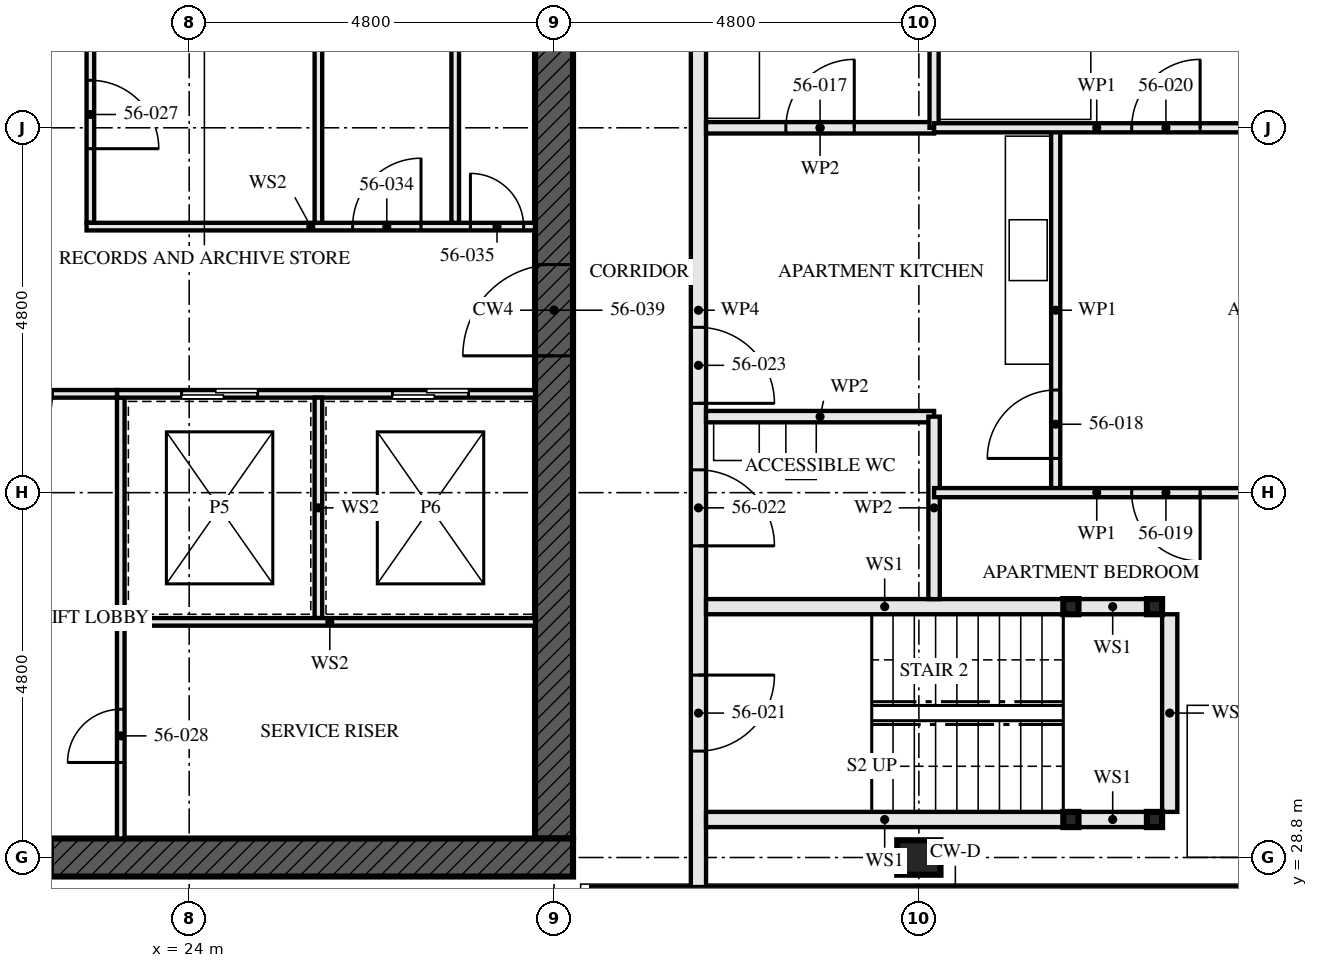
"""IFC4 building model, lengths in metres.
Left out: names, types, materials, properties, quantities, classifications, styles, units other than length and angle.
Written with IfcOpenShell. Run it as: python <this file> out.ifc"""

import sys

from ifc_helpers import new_model, si_unit, direction, frame, frame_2d, origin, origin_2d, place, context, subcontext, project, spatial, rectangle, hollow_rectangle, i_section, extrude, element, fill, save


model = new_model("IFC4")
c1 = context("Model", 3, precision=1e-05, world=origin(), true_north=direction((0.0, 1.0)))
c2 = subcontext(c1, "Body", "Model", "MODEL_VIEW")
j1 = project(units=[si_unit("LENGTHUNIT", "METRE"), si_unit("PLANEANGLEUNIT", "RADIAN")], contexts=[c1])
p1 = place(None, origin())
s1 = spatial("IfcSite", under=j1, at=p1, CompositionType="ELEMENT")
p2 = place(p1, origin())
s2 = spatial("IfcBuilding", under=s1, at=p2, CompositionType="ELEMENT")
p3 = place(p2, frame((0.0, 0.0, 205.0)))
s3 = spatial("IfcBuildingStorey", under=s2, at=p3, CompositionType="ELEMENT", Elevation=205.0)
p4 = place(p3, frame((33.6, 28.8, 0.0), z_axis=(0.0, 0.0, 1.0), x_axis=(0.0, 1.0, 0.0)))
e1 = element("IfcColumn", 1, at=p4, inside=s3, PredefinedType="COLUMN", context=c2, shape_type="SweptSolid", body=[
    extrude(i_section(OverallWidth=0.454, OverallDepth=0.569, WebThickness=0.078, FlangeThickness=0.125, FilletRadius=0.015, at=origin_2d()), origin(), (0.0, 0.0, 1.0), 3.5),
])
p5 = place(p3, frame((14.15, 28.8, -0.17), z_axis=(0.0, 0.0, 1.0), x_axis=(1.0, 0.0, 0.0)))
e2 = element("IfcWall", 2, at=p5, inside=s3, PredefinedType="SHEAR", context=c2, shape_type="SweptSolid", body=[
    extrude(rectangle(XDim=14.9, YDim=0.5, at=frame_2d((7.45, 0.0))), origin(), (0.0, 0.0, 1.0), 3.5),
])
p6 = place(p5, frame((6.85, 0.0, 0.17)))
e3 = element("IfcOpeningElement", 3, at=p6, cuts=e2, PredefinedType="OPENING", context=c2, shape_type="SweptSolid", body=[
    extrude(rectangle(XDim=1.2, YDim=2.1, at=frame_2d((0.6, 1.05))), frame((0.0, 0.26, 0.0), z_axis=(0.0, -1.0, 0.0), x_axis=(1.0, 0.0, 0.0)), (0.0, 0.0, 1.0), 0.521),
])
p7 = place(p3, frame((28.8, 29.05, -0.17), z_axis=(0.0, 0.0, 1.0), x_axis=(0.0, 1.0, 0.0)))
e4 = element("IfcWall", 4, at=p7, inside=s3, PredefinedType="SHEAR", context=c2, shape_type="SweptSolid", body=[
    extrude(rectangle(XDim=13.9, YDim=0.5, at=frame_2d((6.95, 0.0))), origin(), (0.0, 0.0, 1.0), 3.5),
])
p8 = place(p7, frame((6.35, 0.0, 0.17)))
e5 = element("IfcOpeningElement", 5, at=p8, cuts=e4, PredefinedType="OPENING", context=c2, shape_type="SweptSolid", body=[
    extrude(rectangle(XDim=1.2, YDim=2.1, at=frame_2d((0.6, 1.05))), frame((0.0, 0.26, 0.0), z_axis=(0.0, -1.0, 0.0), x_axis=(1.0, 0.0, 0.0)), (0.0, 0.0, 1.0), 0.521),
])
for number, where, z_axis, x_axis in (
    (6, (36.7, 29.3, 0.0), (0.0, 0.0, 1.0), (1.0, 0.0, 0.0)),
    (7, (36.7, 32.1, 0.0), (0.0, 0.0, 1.0), (1.0, 0.0, 0.0)),
    (8, (35.6, 29.3, 0.0), (0.0, 0.0, 1.0), (1.0, 0.0, 0.0)),
    (9, (35.6, 32.1, 0.0), (0.0, 0.0, 1.0), (1.0, 0.0, 0.0)),
):
    element("IfcColumn", number, at=place(p3, frame(where, z_axis=z_axis, x_axis=x_axis)), inside=s3, PredefinedType="COLUMN", context=c2, shape_type="SweptSolid", body=[
        extrude(hollow_rectangle(XDim=0.2, YDim=0.2, WallThickness=0.008, at=origin_2d()), origin(), (0.0, 0.0, 1.0), 3.33),
    ])
p9 = place(p3, frame((36.6, 29.3, 0.0), z_axis=(0.0, 0.0, 1.0), x_axis=(-1.0, 0.0, 0.0)))
e10 = element("IfcWall", 10, at=p9, inside=s3, PredefinedType="SOLIDWALL", context=c2, shape_type="SweptSolid", body=[
    extrude(rectangle(XDim=0.9, YDim=0.2, at=frame_2d((0.45, 0.0))), origin(), (0.0, 0.0, 1.0), 2.99),
])
p10 = place(p3, frame((35.5, 29.3, 0.0), z_axis=(0.0, 0.0, 1.0), x_axis=(-1.0, 0.0, 0.0)))
e11 = element("IfcWall", 11, at=p10, inside=s3, PredefinedType="SOLIDWALL", context=c2, shape_type="SweptSolid", body=[
    extrude(rectangle(XDim=4.7, YDim=0.2, at=frame_2d((2.35, 0.0))), origin(), (0.0, 0.0, 1.0), 2.99),
])
p11 = place(p3, frame((36.6, 32.1, 0.0), z_axis=(0.0, 0.0, 1.0), x_axis=(-1.0, 0.0, 0.0)))
e12 = element("IfcWall", 12, at=p11, inside=s3, PredefinedType="SOLIDWALL", context=c2, shape_type="SweptSolid", body=[
    extrude(rectangle(XDim=0.9, YDim=0.2, at=frame_2d((0.45, 0.0))), origin(), (0.0, 0.0, 1.0), 2.99),
])
p12 = place(p3, frame((35.5, 32.1, 0.0), z_axis=(0.0, 0.0, 1.0), x_axis=(-1.0, 0.0, 0.0)))
e13 = element("IfcWall", 13, at=p12, inside=s3, PredefinedType="SOLIDWALL", context=c2, shape_type="SweptSolid", body=[
    extrude(rectangle(XDim=4.7, YDim=0.2, at=frame_2d((2.35, 0.0))), origin(), (0.0, 0.0, 1.0), 2.99),
])
p13 = place(p3, frame((36.9, 29.4, 0.0), z_axis=(0.0, 0.0, 1.0), x_axis=(0.0, 1.0, 0.0)))
e14 = element("IfcWall", 14, at=p13, inside=s3, PredefinedType="SOLIDWALL", context=c2, shape_type="SweptSolid", body=[
    extrude(rectangle(XDim=2.6, YDim=0.2, at=frame_2d((1.3, 0.0))), origin(), (0.0, 0.0, 1.0), 3.33),
])
p14 = place(p3, frame((33.8, 32.2, 0.0), z_axis=(0.0, 0.0, 1.0), x_axis=(0.0, 1.0, 0.0)))
e15 = element("IfcWall", 15, at=p14, inside=s3, PredefinedType="PARTITIONING", context=c2, shape_type="SweptSolid", body=[
    extrude(rectangle(XDim=2.4, YDim=0.15, at=frame_2d((1.2, 0.0))), origin(), (0.0, 0.0, 1.0), 2.55),
])
p15 = place(p3, frame((33.8, 34.6, 0.0), z_axis=(0.0, 0.0, 1.0), x_axis=(-1.0, 0.0, 0.0)))
e16 = element("IfcWall", 16, at=p15, inside=s3, PredefinedType="PARTITIONING", context=c2, shape_type="SweptSolid", body=[
    extrude(rectangle(XDim=3.0, YDim=0.15, at=frame_2d((1.5, 0.0))), origin(), (0.0, 0.0, 1.0), 3.33),
])
p16 = place(p3, frame((33.8, 38.4, 0.0), z_axis=(0.0, 0.0, 1.0), x_axis=(-1.0, 0.0, 0.0)))
e17 = element("IfcWall", 17, at=p16, inside=s3, PredefinedType="PARTITIONING", context=c2, shape_type="SweptSolid", body=[
    extrude(rectangle(XDim=3.0, YDim=0.15, at=frame_2d((1.5, 0.0))), origin(), (0.0, 0.0, 1.0), 2.55),
])
p17 = place(p16, frame((1.05, 0.0, 0.0)))
e18 = element("IfcOpeningElement", 18, at=p17, cuts=e17, PredefinedType="OPENING", context=c2, shape_type="SweptSolid", body=[
    extrude(rectangle(XDim=0.9, YDim=2.1, at=frame_2d((0.45, 1.05))), frame((0.0, 0.085, 0.0), z_axis=(0.0, -1.0, 0.0), x_axis=(1.0, 0.0, 0.0)), (0.0, 0.0, 1.0), 0.171),
])
p18 = place(p3, frame((35.4, 33.6, 0.0), z_axis=(0.0, 0.0, 1.0), x_axis=(0.0, 1.0, 0.0)))
e19 = element("IfcWall", 19, at=p18, inside=s3, PredefinedType="PARTITIONING", context=c2, shape_type="SweptSolid", body=[
    extrude(rectangle(XDim=4.8, YDim=0.12, at=frame_2d((2.4, 0.0))), origin(), (0.0, 0.0, 1.0), 3.33),
])
p19 = place(p18, frame((0.45, 0.0, 0.0)))
e20 = element("IfcOpeningElement", 20, at=p19, cuts=e19, PredefinedType="OPENING", context=c2, shape_type="SweptSolid", body=[
    extrude(rectangle(XDim=0.9, YDim=2.1, at=frame_2d((0.45, 1.05))), frame((0.0, 0.071, 0.0), z_axis=(0.0, -1.0, 0.0), x_axis=(1.0, 0.0, 0.0)), (0.0, 0.0, 1.0), 0.141),
])
p20 = place(p3, frame((33.8, 38.4, 0.0), z_axis=(0.0, 0.0, 1.0), x_axis=(0.0, 1.0, 0.0)))
e21 = element("IfcWall", 21, at=p20, inside=s3, PredefinedType="PARTITIONING", context=c2, shape_type="SweptSolid", body=[
    extrude(rectangle(XDim=4.553, YDim=0.12, at=frame_2d((2.276, 0.0))), origin(), (0.0, 0.0, 1.0), 3.33),
])
p21 = place(p3, frame((38.08, 33.6, 0.0), z_axis=(0.0, 0.0, 1.0), x_axis=(-1.0, 0.0, 0.0)))
e22 = element("IfcWall", 22, at=p21, inside=s3, PredefinedType="PARTITIONING", context=c2, shape_type="SweptSolid", body=[
    extrude(rectangle(XDim=4.28, YDim=0.12, at=frame_2d((2.14, 0.0))), origin(), (0.0, 0.0, 1.0), 2.55),
])
p22 = place(p21, frame((0.78, 0.0, 0.0)))
e23 = element("IfcOpeningElement", 23, at=p22, cuts=e22, PredefinedType="OPENING", context=c2, shape_type="SweptSolid", body=[
    extrude(rectangle(XDim=0.9, YDim=2.1, at=frame_2d((0.45, 1.05))), frame((0.0, 0.071, 0.0), z_axis=(0.0, -1.0, 0.0), x_axis=(1.0, 0.0, 0.0)), (0.0, 0.0, 1.0), 0.141),
])
p23 = place(p3, frame((38.08, 38.4, 0.0), z_axis=(0.0, 0.0, 1.0), x_axis=(-1.0, 0.0, 0.0)))
e24 = element("IfcWall", 24, at=p23, inside=s3, PredefinedType="PARTITIONING", context=c2, shape_type="SweptSolid", body=[
    extrude(rectangle(XDim=4.28, YDim=0.12, at=frame_2d((2.14, 0.0))), origin(), (0.0, 0.0, 1.0), 2.55),
])
p24 = place(p23, frame((0.78, 0.0, 0.0)))
e25 = element("IfcOpeningElement", 25, at=p24, cuts=e24, PredefinedType="OPENING", context=c2, shape_type="SweptSolid", body=[
    extrude(rectangle(XDim=0.9, YDim=2.1, at=frame_2d((0.45, 1.05))), frame((0.0, 0.071, 0.0), z_axis=(0.0, -1.0, 0.0), x_axis=(1.0, 0.0, 0.0)), (0.0, 0.0, 1.0), 0.141),
])
p25 = place(p3, frame((30.7, 28.345, 0.0), z_axis=(0.0, 0.0, 1.0), x_axis=(0.0, 1.0, 0.0)))
e26 = element("IfcWall", 26, at=p25, inside=s3, PredefinedType="PARTITIONING", context=c2, shape_type="SweptSolid", body=[
    extrude(rectangle(XDim=15.31, YDim=0.2, at=frame_2d((7.655, 0.0))), origin(), (0.0, 0.0, 1.0), 2.32),
])
p26 = place(p25, frame((1.855, 0.0, 0.0)))
e27 = element("IfcOpeningElement", 27, at=p26, cuts=e26, PredefinedType="OPENING", context=c2, shape_type="SweptSolid", body=[
    extrude(rectangle(XDim=1.0, YDim=2.1, at=frame_2d((0.5, 1.05))), frame((0.0, 0.111, 0.0), z_axis=(0.0, -1.0, 0.0), x_axis=(1.0, 0.0, 0.0)), (0.0, 0.0, 1.0), 0.221),
])
p27 = place(p25, frame((4.555, 0.0, 0.0)))
e28 = element("IfcOpeningElement", 28, at=p27, cuts=e26, PredefinedType="OPENING", context=c2, shape_type="SweptSolid", body=[
    extrude(rectangle(XDim=1.0, YDim=2.1, at=frame_2d((0.5, 1.05))), frame((0.0, 0.111, 0.0), z_axis=(0.0, -1.0, 0.0), x_axis=(1.0, 0.0, 0.0)), (0.0, 0.0, 1.0), 0.221),
])
p28 = place(p25, frame((6.43, 0.0, 0.0)))
e29 = element("IfcOpeningElement", 29, at=p28, cuts=e26, PredefinedType="OPENING", context=c2, shape_type="SweptSolid", body=[
    extrude(rectangle(XDim=1.0, YDim=2.1, at=frame_2d((0.5, 1.05))), frame((0.0, 0.111, 0.0), z_axis=(0.0, -1.0, 0.0), x_axis=(1.0, 0.0, 0.0)), (0.0, 0.0, 1.0), 0.221),
])
p29 = place(p3, frame((27.5, 37.15, 0.0), z_axis=(0.0, 0.0, 1.0), x_axis=(0.0, 1.0, 0.0)))
e30 = element("IfcWall", 30, at=p29, inside=s3, PredefinedType="SOLIDWALL", context=c2, shape_type="SweptSolid", body=[
    extrude(rectangle(XDim=5.8, YDim=0.1, at=frame_2d((2.9, 0.0))), origin(), (0.0, 0.0, 1.0), 3.33),
])
p30 = place(p3, frame((22.7, 37.15, 0.0), z_axis=(0.0, 0.0, 1.0), x_axis=(0.0, 1.0, 0.0)))
e31 = element("IfcWall", 31, at=p30, inside=s3, PredefinedType="SOLIDWALL", context=c2, shape_type="SweptSolid", body=[
    extrude(rectangle(XDim=5.8, YDim=0.1, at=frame_2d((2.9, 0.0))), origin(), (0.0, 0.0, 1.0), 3.33),
])
p31 = place(p30, frame((0.975, 0.0, 0.0)))
e32 = element("IfcOpeningElement", 32, at=p31, cuts=e31, PredefinedType="OPENING", context=c2, shape_type="SweptSolid", body=[
    extrude(rectangle(XDim=0.9, YDim=2.1, at=frame_2d((0.45, 1.05))), frame((0.0, 0.061, 0.0), z_axis=(0.0, -1.0, 0.0), x_axis=(1.0, 0.0, 0.0)), (0.0, 0.0, 1.0), 0.121),
])
p32 = place(p3, frame((23.1, 29.05, 0.0), z_axis=(0.0, 0.0, 1.0), x_axis=(0.0, 1.0, 0.0)))
e33 = element("IfcWall", 33, at=p32, inside=s3, PredefinedType="SOLIDWALL", context=c2, shape_type="SweptSolid", body=[
    extrude(rectangle(XDim=5.8, YDim=0.1, at=frame_2d((2.9, 0.0))), origin(), (0.0, 0.0, 1.0), 3.33),
])
p33 = place(p32, frame((1.0, 0.0, 0.0)))
e34 = element("IfcOpeningElement", 34, at=p33, cuts=e33, PredefinedType="OPENING", context=c2, shape_type="SweptSolid", body=[
    extrude(rectangle(XDim=0.7, YDim=2.1, at=frame_2d((0.35, 1.05))), frame((0.0, 0.061, 0.0), z_axis=(0.0, -1.0, 0.0), x_axis=(1.0, 0.0, 0.0)), (0.0, 0.0, 1.0), 0.121),
])
p34 = place(p3, frame((23.05, 34.9, 0.0), z_axis=(0.0, 0.0, 1.0), x_axis=(1.0, 0.0, 0.0)))
e35 = element("IfcWall", 35, at=p34, inside=s3, PredefinedType="SOLIDWALL", context=c2, shape_type="SweptSolid", body=[
    extrude(rectangle(XDim=5.5, YDim=0.1, at=frame_2d((2.75, 0.0))), origin(), (0.0, 0.0, 1.0), 3.33),
])
p35 = place(p34, frame((0.85, 0.0, 0.0)))
e36 = element("IfcOpeningElement", 36, at=p35, cuts=e35, PredefinedType="OPENING", context=c2, shape_type="SweptSolid", body=[
    extrude(rectangle(XDim=1.0, YDim=2.1, at=frame_2d((0.5, 1.05))), frame((0.0, 0.061, 0.0), z_axis=(0.0, -1.0, 0.0), x_axis=(1.0, 0.0, 0.0)), (0.0, 0.0, 1.0), 0.121),
])
p36 = place(p34, frame((3.625, 0.0, 0.0)))
e37 = element("IfcOpeningElement", 37, at=p36, cuts=e35, PredefinedType="OPENING", context=c2, shape_type="SweptSolid", body=[
    extrude(rectangle(XDim=1.0, YDim=2.1, at=frame_2d((0.5, 1.05))), frame((0.0, 0.061, 0.0), z_axis=(0.0, -1.0, 0.0), x_axis=(1.0, 0.0, 0.0)), (0.0, 0.0, 1.0), 0.121),
])
p37 = place(p3, frame((22.65, 37.1, 0.0), z_axis=(0.0, 0.0, 1.0), x_axis=(1.0, 0.0, 0.0)))
e38 = element("IfcWall", 38, at=p37, inside=s3, PredefinedType="SOLIDWALL", context=c2, shape_type="SweptSolid", body=[
    extrude(rectangle(XDim=5.9, YDim=0.1, at=frame_2d((2.95, 0.0))), origin(), (0.0, 0.0, 1.0), 3.33),
])
p38 = place(p37, frame((3.5, 0.0, 0.0)))
e39 = element("IfcOpeningElement", 39, at=p38, cuts=e38, PredefinedType="OPENING", context=c2, shape_type="SweptSolid", body=[
    extrude(rectangle(XDim=0.9, YDim=2.1, at=frame_2d((0.45, 1.05))), frame((0.0, 0.061, 0.0), z_axis=(0.0, -1.0, 0.0), x_axis=(1.0, 0.0, 0.0)), (0.0, 0.0, 1.0), 0.121),
])
p39 = place(p37, frame((5.05, 0.0, 0.0)))
e40 = element("IfcOpeningElement", 40, at=p39, cuts=e38, PredefinedType="OPENING", context=c2, shape_type="SweptSolid", body=[
    extrude(rectangle(XDim=0.7, YDim=2.1, at=frame_2d((0.35, 1.05))), frame((0.0, 0.061, 0.0), z_axis=(0.0, -1.0, 0.0), x_axis=(1.0, 0.0, 0.0)), (0.0, 0.0, 1.0), 0.121),
])
p40 = place(p3, frame((20.55, 34.9, 0.0), z_axis=(0.0, 0.0, 1.0), x_axis=(1.0, 0.0, 0.0)))
e41 = element("IfcWall", 41, at=p40, inside=s3, PredefinedType="SOLIDWALL", context=c2, shape_type="SweptSolid", body=[
    extrude(rectangle(XDim=2.5, YDim=0.1, at=frame_2d((1.25, 0.0))), origin(), (0.0, 0.0, 1.0), 3.33),
])
p41 = place(p40, frame((0.45, 0.0, 0.0)))
e42 = element("IfcOpeningElement", 42, at=p41, cuts=e41, PredefinedType="OPENING", context=c2, shape_type="SweptSolid", body=[
    extrude(rectangle(XDim=1.2, YDim=2.1, at=frame_2d((0.6, 1.05))), frame((0.0, 0.061, 0.0), z_axis=(0.0, -1.0, 0.0), x_axis=(1.0, 0.0, 0.0)), (0.0, 0.0, 1.0), 0.121),
])
p42 = place(p3, frame((25.7, 37.15, 0.0), z_axis=(0.0, 0.0, 1.0), x_axis=(0.0, 1.0, 0.0)))
e43 = element("IfcWall", 43, at=p42, inside=s3, PredefinedType="SOLIDWALL", context=c2, shape_type="SweptSolid", body=[
    extrude(rectangle(XDim=5.8, YDim=0.1, at=frame_2d((2.9, 0.0))), origin(), (0.0, 0.0, 1.0), 3.33),
])
p43 = place(p3, frame((25.7, 31.95, 0.0), z_axis=(0.0, 0.0, 1.0), x_axis=(0.0, 1.0, 0.0)))
e44 = element("IfcWall", 44, at=p43, inside=s3, PredefinedType="SOLIDWALL", context=c2, shape_type="SweptSolid", body=[
    extrude(rectangle(XDim=2.9, YDim=0.1, at=frame_2d((1.45, 0.0))), origin(), (0.0, 0.0, 1.0), 3.33),
])
p44 = place(p3, frame((23.15, 31.9, 0.0), z_axis=(0.0, 0.0, 1.0), x_axis=(1.0, 0.0, 0.0)))
e45 = element("IfcWall", 45, at=p44, inside=s3, PredefinedType="SOLIDWALL", context=c2, shape_type="SweptSolid", body=[
    extrude(rectangle(XDim=5.4, YDim=0.1, at=frame_2d((2.7, 0.0))), origin(), (0.0, 0.0, 1.0), 3.33),
])
p45 = place(p17, frame((0.9, 0.0, 0.0), z_axis=(0.0, 0.0, 1.0), x_axis=(-1.0, 0.0, 0.0)))
e46 = element("IfcDoor", 46, at=p45, inside=s3, OperationType="SINGLE_SWING_LEFT", PredefinedType="DOOR", context=c2, shape_type="SweptSolid", body=[
    extrude(rectangle(XDim=0.9, YDim=2.1, at=frame_2d((0.45, 1.05))), frame((0.0, 0.022, 0.0), z_axis=(0.0, -1.0, 0.0), x_axis=(1.0, 0.0, 0.0)), (0.0, 0.0, 1.0), 0.044),
])
fill(e18, e46)
p46 = place(p19, origin())
e47 = element("IfcDoor", 47, at=p46, inside=s3, OperationType="SINGLE_SWING_RIGHT", PredefinedType="DOOR", context=c2, shape_type="SweptSolid", body=[
    extrude(rectangle(XDim=0.9, YDim=2.1, at=frame_2d((0.45, 1.05))), frame((0.0, 0.022, 0.0), z_axis=(0.0, -1.0, 0.0), x_axis=(1.0, 0.0, 0.0)), (0.0, 0.0, 1.0), 0.044),
])
fill(e20, e47)
p47 = place(p22, origin())
e48 = element("IfcDoor", 48, at=p47, inside=s3, OperationType="SINGLE_SWING_RIGHT", PredefinedType="DOOR", context=c2, shape_type="SweptSolid", body=[
    extrude(rectangle(XDim=0.9, YDim=2.1, at=frame_2d((0.45, 1.05))), frame((0.0, 0.022, 0.0), z_axis=(0.0, -1.0, 0.0), x_axis=(1.0, 0.0, 0.0)), (0.0, 0.0, 1.0), 0.044),
])
fill(e23, e48)
p48 = place(p24, frame((0.9, 0.0, 0.0), z_axis=(0.0, 0.0, 1.0), x_axis=(-1.0, 0.0, 0.0)))
e49 = element("IfcDoor", 49, at=p48, inside=s3, OperationType="SINGLE_SWING_LEFT", PredefinedType="DOOR", context=c2, shape_type="SweptSolid", body=[
    extrude(rectangle(XDim=0.9, YDim=2.1, at=frame_2d((0.45, 1.05))), frame((0.0, 0.022, 0.0), z_axis=(0.0, -1.0, 0.0), x_axis=(1.0, 0.0, 0.0)), (0.0, 0.0, 1.0), 0.044),
])
fill(e25, e49)
p49 = place(p26, frame((1.0, 0.0, 0.0), z_axis=(0.0, 0.0, 1.0), x_axis=(-1.0, 0.0, 0.0)))
e50 = element("IfcDoor", 50, at=p49, inside=s3, OperationType="SINGLE_SWING_RIGHT", PredefinedType="DOOR", context=c2, shape_type="SweptSolid", body=[
    extrude(rectangle(XDim=1.0, YDim=2.1, at=frame_2d((0.5, 1.05))), frame((0.0, 0.032, 0.0), z_axis=(0.0, -1.0, 0.0), x_axis=(1.0, 0.0, 0.0)), (0.0, 0.0, 1.0), 0.064),
])
fill(e27, e50)
p50 = place(p27, frame((1.0, 0.0, 0.0), z_axis=(0.0, 0.0, 1.0), x_axis=(-1.0, 0.0, 0.0)))
e51 = element("IfcDoor", 51, at=p50, inside=s3, OperationType="SINGLE_SWING_LEFT", PredefinedType="DOOR", context=c2, shape_type="SweptSolid", body=[
    extrude(rectangle(XDim=1.0, YDim=2.1, at=frame_2d((0.5, 1.05))), frame((0.0, 0.027, 0.0), z_axis=(0.0, -1.0, 0.0), x_axis=(1.0, 0.0, 0.0)), (0.0, 0.0, 1.0), 0.054),
])
fill(e28, e51)
p51 = place(p28, frame((1.0, 0.0, 0.0), z_axis=(0.0, 0.0, 1.0), x_axis=(-1.0, 0.0, 0.0)))
e52 = element("IfcDoor", 52, at=p51, inside=s3, OperationType="SINGLE_SWING_LEFT", PredefinedType="DOOR", context=c2, shape_type="SweptSolid", body=[
    extrude(rectangle(XDim=1.0, YDim=2.1, at=frame_2d((0.5, 1.05))), frame((0.0, 0.027, 0.0), z_axis=(0.0, -1.0, 0.0), x_axis=(1.0, 0.0, 0.0)), (0.0, 0.0, 1.0), 0.054),
])
fill(e29, e52)
p52 = place(p31, frame((0.9, 0.0, 0.0), z_axis=(0.0, 0.0, 1.0), x_axis=(-1.0, 0.0, 0.0)))
e53 = element("IfcDoor", 53, at=p52, inside=s3, OperationType="SINGLE_SWING_LEFT", PredefinedType="DOOR", context=c2, shape_type="SweptSolid", body=[
    extrude(rectangle(XDim=0.9, YDim=2.1, at=frame_2d((0.45, 1.05))), frame((0.0, 0.027, 0.0), z_axis=(0.0, -1.0, 0.0), x_axis=(1.0, 0.0, 0.0)), (0.0, 0.0, 1.0), 0.054),
])
fill(e32, e53)
p53 = place(p33, origin())
e54 = element("IfcDoor", 54, at=p53, inside=s3, OperationType="SINGLE_SWING_RIGHT", PredefinedType="DOOR", context=c2, shape_type="SweptSolid", body=[
    extrude(rectangle(XDim=0.7, YDim=2.1, at=frame_2d((0.35, 1.05))), frame((0.0, 0.027, 0.0), z_axis=(0.0, -1.0, 0.0), x_axis=(1.0, 0.0, 0.0)), (0.0, 0.0, 1.0), 0.054),
])
fill(e34, e54)
p54 = place(p35, origin())
e55 = element("IfcDoor", 55, at=p54, inside=s3, OperationType="SLIDING_TO_LEFT", PredefinedType="DOOR", context=c2, shape_type="SweptSolid", body=[
    extrude(rectangle(XDim=1.0, YDim=2.1, at=frame_2d((0.5, 1.05))), frame((0.0, 0.05, 0.0), z_axis=(0.0, -1.0, 0.0), x_axis=(1.0, 0.0, 0.0)), (0.0, 0.0, 1.0), 0.1),
])
fill(e36, e55)
p55 = place(p36, origin())
e56 = element("IfcDoor", 56, at=p55, inside=s3, OperationType="SLIDING_TO_LEFT", PredefinedType="DOOR", context=c2, shape_type="SweptSolid", body=[
    extrude(rectangle(XDim=1.0, YDim=2.1, at=frame_2d((0.5, 1.05))), frame((0.0, 0.05, 0.0), z_axis=(0.0, -1.0, 0.0), x_axis=(1.0, 0.0, 0.0)), (0.0, 0.0, 1.0), 0.1),
])
fill(e37, e56)
p56 = place(p38, origin())
e57 = element("IfcDoor", 57, at=p56, inside=s3, OperationType="SINGLE_SWING_LEFT", PredefinedType="DOOR", context=c2, shape_type="SweptSolid", body=[
    extrude(rectangle(XDim=0.9, YDim=2.1, at=frame_2d((0.45, 1.05))), frame((0.0, 0.027, 0.0), z_axis=(0.0, -1.0, 0.0), x_axis=(1.0, 0.0, 0.0)), (0.0, 0.0, 1.0), 0.054),
])
fill(e39, e57)
p57 = place(p39, origin())
e58 = element("IfcDoor", 58, at=p57, inside=s3, OperationType="SINGLE_SWING_RIGHT", PredefinedType="DOOR", context=c2, shape_type="SweptSolid", body=[
    extrude(rectangle(XDim=0.7, YDim=2.1, at=frame_2d((0.35, 1.05))), frame((0.0, 0.027, 0.0), z_axis=(0.0, -1.0, 0.0), x_axis=(1.0, 0.0, 0.0)), (0.0, 0.0, 1.0), 0.054),
])
fill(e40, e58)
p58 = place(p6, origin())
e59 = element("IfcDoor", 59, at=p58, inside=s3, OperationType="SINGLE_SWING_LEFT", PredefinedType="DOOR", context=c2, shape_type="SweptSolid", body=[
    extrude(rectangle(XDim=1.2, YDim=2.1, at=frame_2d((0.6, 1.05))), frame((0.0, 0.027, 0.0), z_axis=(0.0, -1.0, 0.0), x_axis=(1.0, 0.0, 0.0)), (0.0, 0.0, 1.0), 0.054),
])
fill(e3, e59)
p59 = place(p8, origin())
e60 = element("IfcDoor", 60, at=p59, inside=s3, OperationType="SINGLE_SWING_LEFT", PredefinedType="DOOR", context=c2, shape_type="SweptSolid", body=[
    extrude(rectangle(XDim=1.2, YDim=2.1, at=frame_2d((0.6, 1.05))), frame((0.0, 0.027, 0.0), z_axis=(0.0, -1.0, 0.0), x_axis=(1.0, 0.0, 0.0)), (0.0, 0.0, 1.0), 0.054),
])
fill(e5, e60)
save(model, sys.argv[1])
